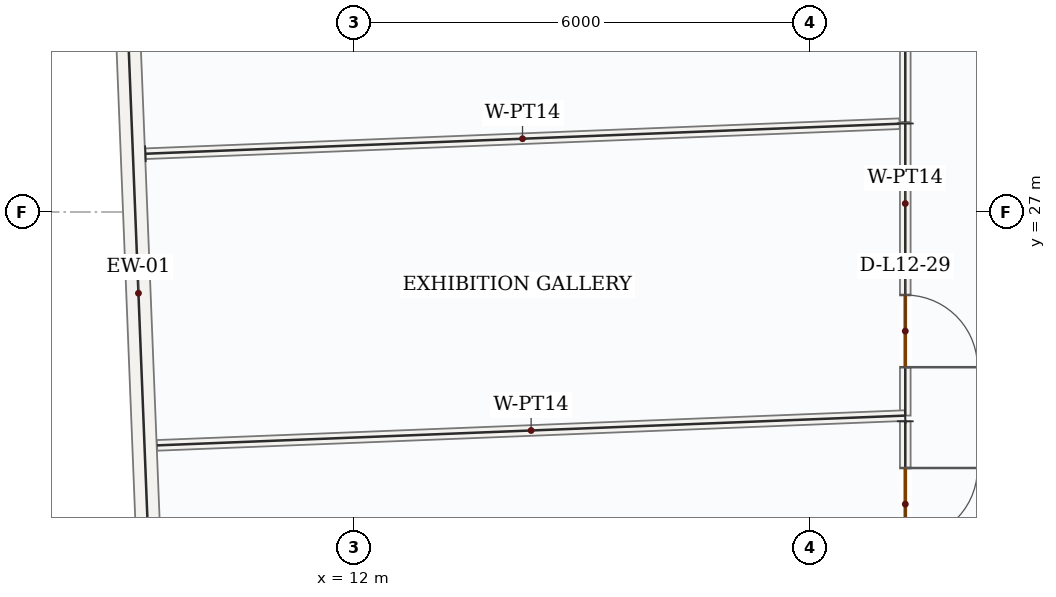
"""IFC4 building model, lengths in metres.
Left out: names, types, materials, properties, quantities, classifications, styles, units other than length and angle.
Written with IfcOpenShell. Run it as: python <this file> out.ifc"""

import sys

from ifc_helpers import new_model, si_unit, direction, frame, frame_2d, origin, place, context, subcontext, project, spatial, rectangle, extrude, source, transform, mapped, element, fill, save


model = new_model("IFC4")
c1 = context("Model", 3, precision=1e-05, world=origin(), true_north=direction((0.0, 1.0)))
c2 = subcontext(c1, "Body", "Model", "MODEL_VIEW")
j1 = project(units=[si_unit("LENGTHUNIT", "METRE"), si_unit("PLANEANGLEUNIT", "RADIAN")], contexts=[c1])
p1 = place(None, origin())
s1 = spatial("IfcSite", under=j1, at=p1, CompositionType="ELEMENT")
p2 = place(p1, origin())
s2 = spatial("IfcBuilding", under=s1, at=p2, CompositionType="ELEMENT")
p3 = place(p2, frame((0.0, 0.0, 58.5)))
s3 = spatial("IfcBuildingStorey", under=s2, at=p3, CompositionType="ELEMENT", Elevation=58.5)
m1 = source(origin(), c2, "Body", "SweptSolid", [
    extrude(rectangle(XDim=9.92, YDim=0.32, at=frame_2d((4.96, 0.0))), origin(), (0.0, 0.0, 1.0), 3.95),
])
p4 = place(p3, frame((9.359, 20.975, 0.0), z_axis=(0.0, 0.0, 1.0), x_axis=(-0.03977146366, 0.999208802342, 0.0)))
e1 = element("IfcWall", 1, at=p4, inside=s3, PredefinedType="SOLIDWALL", context=c2, shape_type="MappedRepresentation", body=[
    mapped(m1, transform((0.0, 0.0, 0.0), x_axis=(1.0, 0.0, 0.0), y_axis=(0.0, 1.0, 0.0), z_axis=(0.0, 0.0, 1.0), scale=1.0)),
])
p5 = place(p3, frame((19.25, 28.165, 0.0), z_axis=(0.0, 0.0, 1.0), x_axis=(0.0, -1.0, 0.0)))
e2 = element("IfcWall", 2, at=p5, inside=s3, PredefinedType="PARTITIONING", context=c2, shape_type="SweptSolid", body=[
    extrude(rectangle(XDim=3.843, YDim=0.14, at=frame_2d((1.921, 0.0))), origin(), (0.0, 0.0, 1.0), 3.95),
])
p6 = place(p5, frame((2.257, 0.0, 0.0)))
e3 = element("IfcOpeningElement", 3, at=p6, cuts=e2, PredefinedType="OPENING", context=c2, shape_type="SweptSolid", body=[
    extrude(rectangle(XDim=0.95, YDim=2.15, at=frame_2d((0.475, 1.075))), frame((0.0, 0.08, 0.0), z_axis=(0.0, -1.0, 0.0), x_axis=(1.0, 0.0, 0.0)), (0.0, 0.0, 1.0), 0.16),
])
m2 = source(origin(), c2, "Body", "SweptSolid", [
    extrude(rectangle(XDim=9.851, YDim=0.14, at=frame_2d((4.925, 0.0))), origin(), (0.0, 0.0, 1.0), 3.95),
])
p7 = place(p3, frame((19.249, 24.322, 0.0), z_axis=(0.0, 0.0, 1.0), x_axis=(-0.999208542072, -0.039778002084, 0.0)))
e4 = element("IfcWall", 4, at=p7, inside=s3, PredefinedType="PARTITIONING", context=c2, shape_type="MappedRepresentation", body=[
    mapped(m2, transform((0.0, 0.0, 0.0), x_axis=(1.0, 0.0, 0.0), y_axis=(0.0, 1.0, 0.0), z_axis=(0.0, 0.0, 1.0), scale=1.0)),
])
m3 = source(origin(), c2, "Body", "SweptSolid", [
    extrude(rectangle(XDim=9.929, YDim=0.14, at=frame_2d((4.965, 0.0))), origin(), (0.0, 0.0, 1.0), 3.95),
])
p8 = place(p3, frame((9.253, 27.767, 0.0), z_axis=(0.0, 0.0, 1.0), x_axis=(0.999208364847, 0.039782453661, 0.0)))
e5 = element("IfcWall", 5, at=p8, inside=s3, PredefinedType="PARTITIONING", context=c2, shape_type="MappedRepresentation", body=[
    mapped(m3, transform((0.0, 0.0, 0.0), x_axis=(1.0, 0.0, 0.0), y_axis=(0.0, 1.0, 0.0), z_axis=(0.0, 0.0, 1.0), scale=1.0)),
])
p9 = place(p3, frame((19.25, 33.496, 0.0), z_axis=(0.0, 0.0, 1.0), x_axis=(-9.1924438e-05, -0.999999995775, 0.0)))
e6 = element("IfcWall", 6, at=p9, inside=s3, PredefinedType="PARTITIONING", context=c2, shape_type="SweptSolid", body=[
    extrude(rectangle(XDim=5.312, YDim=0.14, at=frame_2d((2.656, 0.0))), origin(), (0.0, 0.0, 1.0), 3.95),
])
p10 = place(p9, frame((2.835, 0.0, 0.0)))
e7 = element("IfcOpeningElement", 7, at=p10, cuts=e6, PredefinedType="OPENING", context=c2, shape_type="SweptSolid", body=[
    extrude(rectangle(XDim=0.95, YDim=2.15, at=frame_2d((0.475, 1.075))), frame((0.0, 0.08, 0.0), z_axis=(0.0, -1.0, 0.0), x_axis=(1.0, 0.0, 0.0)), (0.0, 0.0, 1.0), 0.16),
])
p11 = place(p3, frame((19.25, 24.247, 0.0), z_axis=(0.0, 0.0, 1.0), x_axis=(0.000326008981, -0.999999946859, 0.0)))
e8 = element("IfcWall", 8, at=p11, inside=s3, PredefinedType="PARTITIONING", context=c2, shape_type="SweptSolid", body=[
    extrude(rectangle(XDim=3.744, YDim=0.14, at=frame_2d((1.872, 0.0))), origin(), (0.0, 0.0, 1.0), 3.95),
])
p12 = place(p11, frame((0.615, 0.0, 0.0)))
e9 = element("IfcOpeningElement", 9, at=p12, cuts=e8, PredefinedType="OPENING", context=c2, shape_type="SweptSolid", body=[
    extrude(rectangle(XDim=0.95, YDim=2.15, at=frame_2d((0.475, 1.075))), frame((0.0, 0.08, 0.0), z_axis=(0.0, -1.0, 0.0), x_axis=(1.0, 0.0, 0.0)), (0.0, 0.0, 1.0), 0.16),
])
m4 = source(origin(), c2, "Body", "SweptSolid", [
    extrude(rectangle(XDim=0.95, YDim=2.15, at=frame_2d((0.475, 1.075))), frame((0.0, 0.025, 0.0), z_axis=(0.0, -1.0, 0.0), x_axis=(1.0, 0.0, 0.0)), (0.0, 0.0, 1.0), 0.05),
])
p13 = place(p6, origin())
e10 = element("IfcDoor", 10, at=p13, inside=s3, OperationType="SINGLE_SWING_RIGHT", PredefinedType="DOOR", context=c2, shape_type="MappedRepresentation", body=[
    mapped(m4, transform((0.0, 0.0, 0.0), x_axis=(1.0, 0.0, 0.0), y_axis=(0.0, 1.0, 0.0), z_axis=(0.0, 0.0, 1.0), scale=1.0)),
])
fill(e3, e10)
p14 = place(p12, origin())
e11 = element("IfcDoor", 11, at=p14, inside=s3, OperationType="SINGLE_SWING_LEFT", PredefinedType="DOOR", context=c2, shape_type="MappedRepresentation", body=[
    mapped(m4, transform((0.0, 0.0, 0.0), x_axis=(1.0, 0.0, 0.0), y_axis=(0.0, 1.0, 0.0), z_axis=(0.0, 0.0, 1.0), scale=1.0)),
])
fill(e9, e11)
save(model, sys.argv[1])
